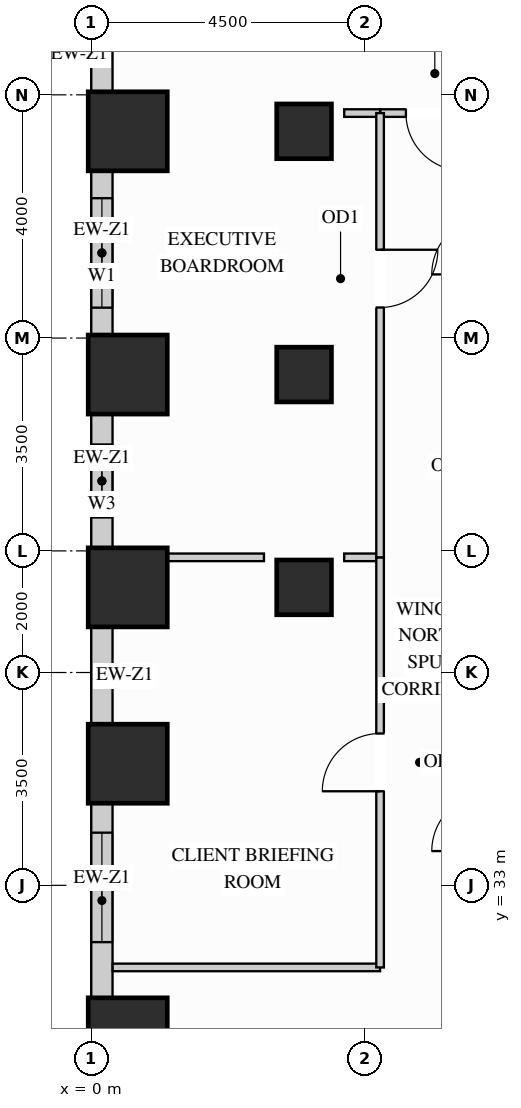
"""IFC4 building model, lengths in metres.
Left out: names, types, materials, properties, quantities, classifications, styles, units other than length and angle.
Written with IfcOpenShell. Run it as: python <this file> out.ifc"""

import sys

from ifc_helpers import new_model, si_unit, direction, frame, frame_2d, origin, origin_2d, place, context, subcontext, project, spatial, rectangle, extrude, source, transform, mapped, element, fill, save


model = new_model("IFC4")
c1 = context("Model", 3, precision=1e-05, world=origin(), true_north=direction((0.0, 1.0)))
c2 = subcontext(c1, "Body", "Model", "MODEL_VIEW")
j1 = project(units=[si_unit("LENGTHUNIT", "METRE"), si_unit("PLANEANGLEUNIT", "RADIAN")], contexts=[c1])
p1 = place(None, origin())
s1 = spatial("IfcSite", under=j1, at=p1, CompositionType="ELEMENT")
p2 = place(p1, origin())
s2 = spatial("IfcBuilding", under=s1, at=p2, CompositionType="ELEMENT")
p3 = place(p2, frame((0.0, 0.0, 44.1)))
s3 = spatial("IfcBuildingStorey", under=s2, at=p3, CompositionType="ELEMENT", Elevation=44.1)
m1 = source(origin(), c2, "Body", "SweptSolid", [
    extrude(rectangle(XDim=0.9, YDim=0.9, at=origin_2d()), origin(), (0.0, 0.0, 1.0), 3.38),
])
for number, where, z_axis, x_axis in (
    (1, (3.5, 37.9, 0.0), (0.0, 0.0, 1.0), (1.0, 0.0, 0.0)),
    (2, (3.5, 41.4, 0.0), (0.0, 0.0, 1.0), (1.0, 0.0, 0.0)),
    (3, (3.5, 45.4, 0.0), (0.0, 0.0, 1.0), (1.0, 0.0, 0.0)),
):
    element("IfcColumn", number, at=place(p3, frame(where, z_axis=z_axis, x_axis=x_axis)), inside=s3, PredefinedType="COLUMN", context=c2, shape_type="MappedRepresentation", body=[
        mapped(m1, transform((0.0, 0.0, 0.0), x_axis=(1.0, 0.0, 0.0), y_axis=(0.0, 1.0, 0.0), z_axis=(0.0, 0.0, 1.0))),
    ])
m2 = source(origin(), c2, "Body", "SweptSolid", [
    extrude(rectangle(XDim=1.3, YDim=1.3, at=origin_2d()), origin(), (0.0, 0.0, 1.0), 3.38),
])
for number, where, z_axis, x_axis in (
    (4, (0.6, 30.5, 0.0), (0.0, 0.0, 1.0), (1.0, 0.0, 0.0)),
    (5, (0.6, 35.0, 0.0), (0.0, 0.0, 1.0), (1.0, 0.0, 0.0)),
    (6, (0.6, 37.9, 0.0), (0.0, 0.0, 1.0), (1.0, 0.0, 0.0)),
    (7, (0.6, 41.4, 0.0), (0.0, 0.0, 1.0), (1.0, 0.0, 0.0)),
    (8, (0.6, 45.4, 0.0), (0.0, 0.0, 1.0), (1.0, 0.0, 0.0)),
):
    element("IfcColumn", number, at=place(p3, frame(where, z_axis=z_axis, x_axis=x_axis)), inside=s3, PredefinedType="COLUMN", context=c2, shape_type="MappedRepresentation", body=[
        mapped(m2, transform((0.0, 0.0, 0.0), x_axis=(1.0, 0.0, 0.0), y_axis=(0.0, 1.0, 0.0), z_axis=(0.0, 0.0, 1.0))),
    ])
m3 = source(origin(), c2, "Body", "SweptSolid", [
    extrude(rectangle(XDim=1.104, YDim=0.35, at=frame_2d((0.552, 0.0))), origin(), (0.0, 0.0, 1.0), 3.365),
])
p4 = place(p3, frame((0.175, 47.152, 0.0), z_axis=(0.0, 0.0, 1.0), x_axis=(0.0, -1.0, 0.0)))
e9 = element("IfcWall", 9, at=p4, inside=s3, PredefinedType="SOLIDWALL", context=c2, shape_type="MappedRepresentation", body=[
    mapped(m3, transform((0.0, 0.0, 0.0), x_axis=(1.0, 0.0, 0.0), y_axis=(0.0, 1.0, 0.0), z_axis=(0.0, 0.0, 1.0))),
])
p5 = place(p3, frame((0.175, 44.752, 0.0), z_axis=(0.0, 0.0, 1.0), x_axis=(0.0, -1.0, 0.0)))
e10 = element("IfcWall", 10, at=p5, inside=s3, PredefinedType="SOLIDWALL", context=c2, shape_type="SweptSolid", body=[
    extrude(rectangle(XDim=2.704, YDim=0.35, at=frame_2d((1.352, 0.0))), origin(), (0.0, 0.0, 1.0), 2.51),
])
p6 = place(p5, frame((0.452, 0.0, 0.78)))
e11 = element("IfcOpeningElement", 11, at=p6, cuts=e10, PredefinedType="OPENING", context=c2, shape_type="SweptSolid", body=[
    extrude(rectangle(XDim=1.8, YDim=1.55, at=frame_2d((0.9, 0.775))), frame((0.0, 0.185, 0.0), z_axis=(0.0, -1.0, 0.0), x_axis=(1.0, 0.0, 0.0)), (0.0, 0.0, 1.0), 0.37),
])
p7 = place(p3, frame((0.175, 40.752, 0.0), z_axis=(0.0, 0.0, 1.0), x_axis=(0.0, -1.0, 0.0)))
e12 = element("IfcWall", 12, at=p7, inside=s3, PredefinedType="SOLIDWALL", context=c2, shape_type="SweptSolid", body=[
    extrude(rectangle(XDim=2.204, YDim=0.35, at=frame_2d((1.102, 0.0))), origin(), (0.0, 0.0, 1.0), 2.51),
])
p8 = place(p7, frame((0.502, 0.0, 0.78)))
e13 = element("IfcOpeningElement", 13, at=p8, cuts=e12, PredefinedType="OPENING", context=c2, shape_type="SweptSolid", body=[
    extrude(rectangle(XDim=1.2, YDim=1.55, at=frame_2d((0.6, 0.775))), frame((0.0, 0.185, 0.0), z_axis=(0.0, -1.0, 0.0), x_axis=(1.0, 0.0, 0.0)), (0.0, 0.0, 1.0), 0.37),
])
m4 = source(origin(), c2, "Body", "SweptSolid", [
    extrude(rectangle(XDim=1.604, YDim=0.35, at=frame_2d((0.802, 0.0))), origin(), (0.0, 0.0, 1.0), 2.51),
])
p9 = place(p3, frame((0.175, 37.252, 0.0), z_axis=(0.0, 0.0, 1.0), x_axis=(0.0, -1.0, 0.0)))
e14 = element("IfcWall", 14, at=p9, inside=s3, PredefinedType="SOLIDWALL", context=c2, shape_type="MappedRepresentation", body=[
    mapped(m4, transform((0.0, 0.0, 0.0), x_axis=(1.0, 0.0, 0.0), y_axis=(0.0, 1.0, 0.0), z_axis=(0.0, 0.0, 1.0))),
])
p10 = place(p3, frame((0.175, 34.352, 0.0), z_axis=(0.0, 0.0, 1.0), x_axis=(0.0, -1.0, 0.0)))
e15 = element("IfcWall", 15, at=p10, inside=s3, PredefinedType="SOLIDWALL", context=c2, shape_type="SweptSolid", body=[
    extrude(rectangle(XDim=3.204, YDim=0.35, at=frame_2d((1.602, 0.0))), origin(), (0.0, 0.0, 1.0), 2.51),
])
p11 = place(p10, frame((0.486, 0.0, 0.78)))
e16 = element("IfcOpeningElement", 16, at=p11, cuts=e15, PredefinedType="OPENING", context=c2, shape_type="SweptSolid", body=[
    extrude(rectangle(XDim=1.8, YDim=1.55, at=frame_2d((0.9, 0.775))), frame((0.0, 0.185, 0.0), z_axis=(0.0, -1.0, 0.0), x_axis=(1.0, 0.0, 0.0)), (0.0, 0.0, 1.0), 0.37),
])
m5 = source(origin(), c2, "Body", "SweptSolid", [
    extrude(rectangle(XDim=4.398, YDim=0.125, at=frame_2d((2.199, 0.0))), origin(), (0.0, 0.0, 1.0), 2.828),
])
p12 = place(p3, frame((0.352, 31.65, 0.0), z_axis=(0.0, 0.0, 1.0), x_axis=(1.0, 0.0, 0.0)))
e17 = element("IfcWall", 17, at=p12, inside=s3, PredefinedType="PARTITIONING", context=c2, shape_type="MappedRepresentation", body=[
    mapped(m5, transform((0.0, 0.0, 0.0), x_axis=(1.0, 0.0, 0.0), y_axis=(0.0, 1.0, 0.0), z_axis=(0.0, 0.0, 1.0))),
])
m6 = source(origin(), c2, "Body", "SweptSolid", [
    extrude(rectangle(XDim=1.58, YDim=0.125, at=frame_2d((0.79, 0.0))), origin(), (0.0, 0.0, 1.0), 3.365),
])
p13 = place(p3, frame((1.26, 38.394, 0.0), z_axis=(0.0, 0.0, 1.0), x_axis=(1.0, 0.0, 0.0)))
e18 = element("IfcWall", 18, at=p13, inside=s3, PredefinedType="PARTITIONING", context=c2, shape_type="MappedRepresentation", body=[
    mapped(m6, transform((0.0, 0.0, 0.0), x_axis=(1.0, 0.0, 0.0), y_axis=(0.0, 1.0, 0.0), z_axis=(0.0, 0.0, 1.0))),
])
m7 = source(origin(), c2, "Body", "SweptSolid", [
    extrude(rectangle(XDim=0.59, YDim=0.125, at=frame_2d((0.295, 0.0))), origin(), (0.0, 0.0, 1.0), 3.365),
])
p14 = place(p3, frame((4.16, 38.394, 0.0), z_axis=(0.0, 0.0, 1.0), x_axis=(1.0, 0.0, 0.0)))
e19 = element("IfcWall", 19, at=p14, inside=s3, PredefinedType="PARTITIONING", context=c2, shape_type="MappedRepresentation", body=[
    mapped(m7, transform((0.0, 0.0, 0.0), x_axis=(1.0, 0.0, 0.0), y_axis=(0.0, 1.0, 0.0), z_axis=(0.0, 0.0, 1.0))),
])
p15 = place(p3, frame((4.75, 45.7, 0.0), z_axis=(0.0, 0.0, 1.0), x_axis=(1.0, 0.0, 0.0)))
e20 = element("IfcWall", 20, at=p15, inside=s3, PredefinedType="PARTITIONING", context=c2, shape_type="SweptSolid", body=[
    extrude(rectangle(XDim=1.8, YDim=0.125, at=frame_2d((0.9, 0.0))), origin(), (0.0, 0.0, 1.0), 2.67),
])
p16 = place(p15, frame((0.425, 0.0, 0.0)))
e21 = element("IfcOpeningElement", 21, at=p16, cuts=e20, PredefinedType="OPENING", context=c2, shape_type="SweptSolid", body=[
    extrude(rectangle(XDim=0.95, YDim=2.15, at=frame_2d((0.475, 1.075))), frame((0.0, 0.073, 0.0), z_axis=(0.0, -1.0, 0.0), x_axis=(1.0, 0.0, 0.0)), (0.0, 0.0, 1.0), 0.145),
])
m8 = source(origin(), c2, "Body", "SweptSolid", [
    extrude(rectangle(XDim=0.59, YDim=0.125, at=frame_2d((0.295, 0.0))), origin(), (0.0, 0.0, 1.0), 2.67),
])
p17 = place(p3, frame((4.16, 45.7, 0.0), z_axis=(0.0, 0.0, 1.0), x_axis=(1.0, 0.0, 0.0)))
e22 = element("IfcWall", 22, at=p17, inside=s3, PredefinedType="PARTITIONING", context=c2, shape_type="MappedRepresentation", body=[
    mapped(m8, transform((0.0, 0.0, 0.0), x_axis=(1.0, 0.0, 0.0), y_axis=(0.0, 1.0, 0.0), z_axis=(0.0, 0.0, 1.0))),
])
p18 = place(p3, frame((4.75, 31.65, 0.0), z_axis=(0.0, 0.0, 1.0), x_axis=(0.0, 1.0, 0.0)))
e23 = element("IfcWall", 23, at=p18, inside=s3, PredefinedType="PARTITIONING", context=c2, shape_type="SweptSolid", body=[
    extrude(rectangle(XDim=6.744, YDim=0.125, at=frame_2d((3.372, 0.0))), origin(), (0.0, 0.0, 1.0), 3.365),
])
p19 = place(p18, frame((2.897, 0.0, 0.0)))
e24 = element("IfcOpeningElement", 24, at=p19, cuts=e23, PredefinedType="OPENING", context=c2, shape_type="SweptSolid", body=[
    extrude(rectangle(XDim=0.95, YDim=2.15, at=frame_2d((0.475, 1.075))), frame((0.0, 0.073, 0.0), z_axis=(0.0, -1.0, 0.0), x_axis=(1.0, 0.0, 0.0)), (0.0, 0.0, 1.0), 0.145),
])
p20 = place(p3, frame((4.75, 38.394, 0.0), z_axis=(0.0, 0.0, 1.0), x_axis=(0.0, 1.0, 0.0)))
e25 = element("IfcWall", 25, at=p20, inside=s3, PredefinedType="PARTITIONING", context=c2, shape_type="SweptSolid", body=[
    extrude(rectangle(XDim=7.306, YDim=0.125, at=frame_2d((3.653, 0.0))), origin(), (0.0, 0.0, 1.0), 3.365),
])
p21 = place(p20, frame((4.108, 0.0, 0.0)))
e26 = element("IfcOpeningElement", 26, at=p21, cuts=e25, PredefinedType="OPENING", context=c2, shape_type="SweptSolid", body=[
    extrude(rectangle(XDim=0.95, YDim=2.15, at=frame_2d((0.475, 1.075))), frame((0.0, 0.073, 0.0), z_axis=(0.0, -1.0, 0.0), x_axis=(1.0, 0.0, 0.0)), (0.0, 0.0, 1.0), 0.145),
])
m9 = source(origin(), c2, "Body", "SweptSolid", [
    extrude(rectangle(XDim=0.95, YDim=2.15, at=frame_2d((0.475, 1.075))), frame((0.0, 0.025, 0.0), z_axis=(0.0, -1.0, 0.0), x_axis=(1.0, 0.0, 0.0)), (0.0, 0.0, 1.0), 0.05),
])
p22 = place(p16, origin())
e27 = element("IfcDoor", 27, at=p22, inside=s3, OperationType="SINGLE_SWING_RIGHT", PredefinedType="DOOR", context=c2, shape_type="MappedRepresentation", body=[
    mapped(m9, transform((0.0, 0.0, 0.0), x_axis=(1.0, 0.0, 0.0), y_axis=(0.0, 1.0, 0.0), z_axis=(0.0, 0.0, 1.0))),
])
fill(e21, e27)
p23 = place(p19, origin())
e28 = element("IfcDoor", 28, at=p23, inside=s3, OperationType="SINGLE_SWING_LEFT", PredefinedType="DOOR", context=c2, shape_type="MappedRepresentation", body=[
    mapped(m9, transform((0.0, 0.0, 0.0), x_axis=(1.0, 0.0, 0.0), y_axis=(0.0, 1.0, 0.0), z_axis=(0.0, 0.0, 1.0))),
])
fill(e24, e28)
p24 = place(p21, origin())
e29 = element("IfcDoor", 29, at=p24, inside=s3, OperationType="SINGLE_SWING_RIGHT", PredefinedType="DOOR", context=c2, shape_type="MappedRepresentation", body=[
    mapped(m9, transform((0.0, 0.0, 0.0), x_axis=(1.0, 0.0, 0.0), y_axis=(0.0, 1.0, 0.0), z_axis=(0.0, 0.0, 1.0))),
])
fill(e26, e29)
m10 = source(origin(), c2, "Body", "SweptSolid", [
    extrude(rectangle(XDim=1.8, YDim=1.55, at=frame_2d((0.9, 0.775))), frame((0.0, 0.03, 0.0), z_axis=(0.0, -1.0, 0.0), x_axis=(1.0, 0.0, 0.0)), (0.0, 0.0, 1.0), 0.06),
])
p25 = place(p6, origin())
e30 = element("IfcWindow", 30, at=p25, inside=s3, PartitioningType="SINGLE_PANEL", PredefinedType="WINDOW", context=c2, shape_type="MappedRepresentation", body=[
    mapped(m10, transform((0.0, 0.0, 0.0), x_axis=(1.0, 0.0, 0.0), y_axis=(0.0, 1.0, 0.0), z_axis=(0.0, 0.0, 1.0))),
])
fill(e11, e30)
p26 = place(p11, origin())
e31 = element("IfcWindow", 31, at=p26, inside=s3, PartitioningType="SINGLE_PANEL", PredefinedType="WINDOW", context=c2, shape_type="MappedRepresentation", body=[
    mapped(m10, transform((0.0, 0.0, 0.0), x_axis=(1.0, 0.0, 0.0), y_axis=(0.0, 1.0, 0.0), z_axis=(0.0, 0.0, 1.0))),
])
fill(e16, e31)
m11 = source(origin(), c2, "Body", "SweptSolid", [
    extrude(rectangle(XDim=1.2, YDim=1.55, at=frame_2d((0.6, 0.775))), frame((0.0, 0.03, 0.0), z_axis=(0.0, -1.0, 0.0), x_axis=(1.0, 0.0, 0.0)), (0.0, 0.0, 1.0), 0.06),
])
p27 = place(p8, origin())
e32 = element("IfcWindow", 32, at=p27, inside=s3, PartitioningType="SINGLE_PANEL", PredefinedType="WINDOW", context=c2, shape_type="MappedRepresentation", body=[
    mapped(m11, transform((0.0, 0.0, 0.0), x_axis=(1.0, 0.0, 0.0), y_axis=(0.0, 1.0, 0.0), z_axis=(0.0, 0.0, 1.0))),
])
fill(e13, e32)
save(model, sys.argv[1])
